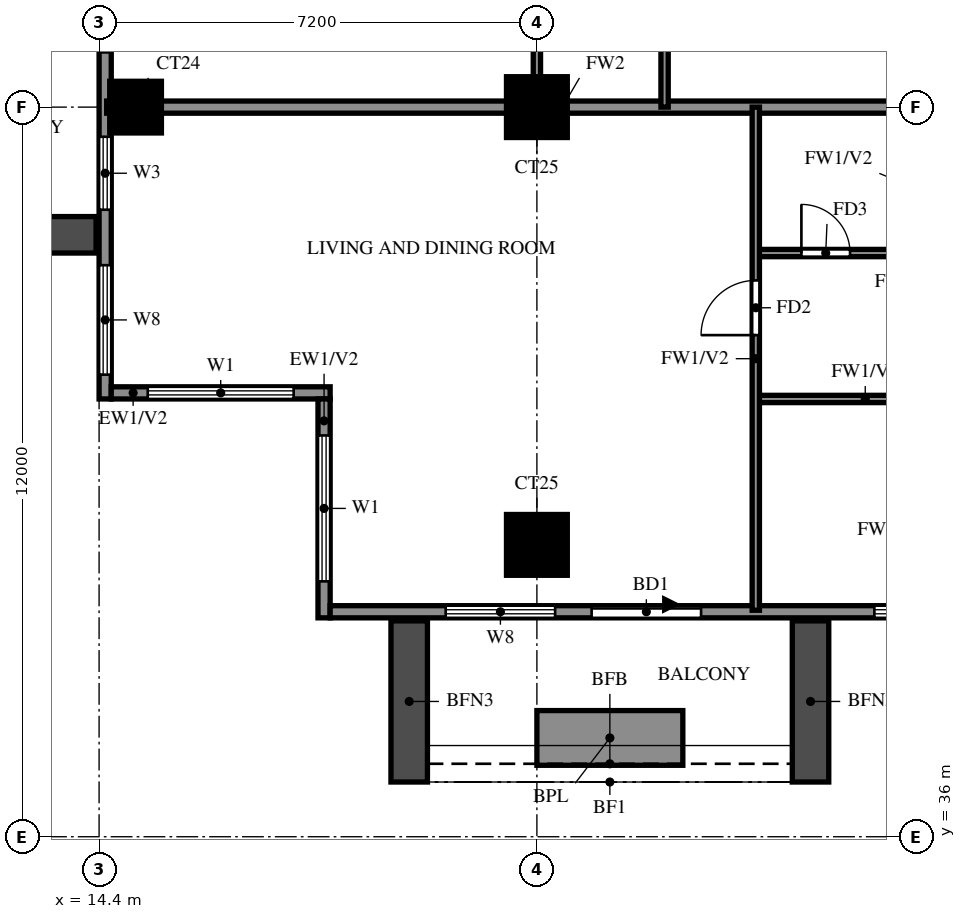
"""IFC4 building model, lengths in metres.
Left out: names, types, materials, properties, quantities, classifications, styles, units other than length and angle.
Written with IfcOpenShell. Run it as: python <this file> out.ifc"""

import sys

from ifc_helpers import new_model, si_unit, direction, frame, frame_2d, origin, origin_2d, place, context, subcontext, project, spatial, rectangle, extrude, source, transform, mapped, element, fill, save


model = new_model("IFC4")
c1 = context("Model", 3, precision=1e-05, world=origin(), true_north=direction((0.0, 1.0)))
c2 = subcontext(c1, "Body", "Model", "MODEL_VIEW")
j1 = project(units=[si_unit("LENGTHUNIT", "METRE"), si_unit("PLANEANGLEUNIT", "RADIAN")], contexts=[c1])
p1 = place(None, origin())
s1 = spatial("IfcSite", under=j1, at=p1, CompositionType="ELEMENT")
p2 = place(p1, origin())
s2 = spatial("IfcBuilding", under=s1, at=p2, CompositionType="ELEMENT")
p3 = place(p2, frame((0.0, 0.0, 157.0)))
s3 = spatial("IfcBuildingStorey", under=s2, at=p3, CompositionType="ELEMENT", Elevation=157.0)
m1 = source(origin(), c2, "Body", "SweptSolid", [
    extrude(rectangle(XDim=1.0, YDim=1.0, at=origin_2d()), origin(), (0.0, 0.0, 1.0), 3.2),
])
p4 = place(p3, frame((21.6, 40.8, 0.0), z_axis=(0.0, 0.0, 1.0), x_axis=(1.0, 0.0, 0.0)))
e1 = element("IfcColumn", 1, at=p4, inside=s3, PredefinedType="COLUMN", context=c2, shape_type="MappedRepresentation", body=[
    mapped(m1, transform((0.0, 0.0, 0.0))),
])
m2 = source(origin(), c2, "Body", "SweptSolid", [
    extrude(rectangle(XDim=0.85, YDim=0.85, at=origin_2d()), origin(), (0.0, 0.0, 1.0), 3.2),
])
p5 = place(p3, frame((15.0, 48.0, 0.0), z_axis=(0.0, 0.0, 1.0), x_axis=(1.0, 0.0, 0.0)))
e2 = element("IfcColumn", 2, at=p5, inside=s3, PredefinedType="COLUMN", context=c2, shape_type="MappedRepresentation", body=[
    mapped(m2, transform((0.0, 0.0, 0.0))),
])
p6 = place(p3, frame((21.6, 48.0, 0.0), z_axis=(0.0, 0.0, 1.0), x_axis=(1.0, 0.0, 0.0)))
e3 = element("IfcColumn", 3, at=p6, inside=s3, PredefinedType="COLUMN", context=c2, shape_type="MappedRepresentation", body=[
    mapped(m1, transform((0.0, 0.0, 0.0))),
])
p7 = place(p3, frame((14.5, 76.6, 0.0), z_axis=(0.0, 0.0, 1.0), x_axis=(0.0, -1.0, 0.0)))
e4 = element("IfcWall", 4, at=p7, inside=s3, PredefinedType="SOLIDWALL", context=c2, shape_type="SweptSolid", body=[
    extrude(rectangle(XDim=33.4, YDim=0.2, at=frame_2d((16.7, 0.0))), origin(), (0.0, 0.0, 1.0), 3.2),
])
p8 = place(p7, frame((11.5, 0.0, 0.0)))
e5 = element("IfcOpeningElement", 5, at=p8, cuts=e4, PredefinedType="OPENING", context=c2, shape_type="SweptSolid", body=[
    extrude(rectangle(XDim=1.8, YDim=2.4, at=frame_2d((0.9, 1.2))), frame((0.0, 0.11, 0.0), z_axis=(0.0, -1.0, 0.0), x_axis=(1.0, 0.0, 0.0)), (0.0, 0.0, 1.0), 0.22),
])
p9 = place(p7, frame((25.9, 0.0, 0.0)))
e6 = element("IfcOpeningElement", 6, at=p9, cuts=e4, PredefinedType="OPENING", context=c2, shape_type="SweptSolid", body=[
    extrude(rectangle(XDim=1.8, YDim=2.4, at=frame_2d((0.9, 1.2))), frame((0.0, 0.11, 0.0), z_axis=(0.0, -1.0, 0.0), x_axis=(1.0, 0.0, 0.0)), (0.0, 0.0, 1.0), 0.22),
])
p10 = place(p7, frame((29.087, 0.0, 0.6)))
e7 = element("IfcOpeningElement", 7, at=p10, cuts=e4, PredefinedType="OPENING", context=c2, shape_type="SweptSolid", body=[
    extrude(rectangle(XDim=1.2, YDim=2.4, at=frame_2d((0.6, 1.2))), frame((0.0, 0.11, 0.0), z_axis=(0.0, -1.0, 0.0), x_axis=(1.0, 0.0, 0.0)), (0.0, 0.0, 1.0), 0.22),
])
p11 = place(p7, frame((31.2, 0.0, 0.6)))
e8 = element("IfcOpeningElement", 8, at=p11, cuts=e4, PredefinedType="OPENING", context=c2, shape_type="SweptSolid", body=[
    extrude(rectangle(XDim=1.8, YDim=2.4, at=frame_2d((0.9, 1.2))), frame((0.0, 0.11, 0.0), z_axis=(0.0, -1.0, 0.0), x_axis=(1.0, 0.0, 0.0)), (0.0, 0.0, 1.0), 0.22),
])
p12 = place(p7, frame((21.887, 0.0, 0.6)))
e9 = element("IfcOpeningElement", 9, at=p12, cuts=e4, PredefinedType="OPENING", context=c2, shape_type="SweptSolid", body=[
    extrude(rectangle(XDim=1.8, YDim=2.4, at=frame_2d((0.9, 1.2))), frame((0.0, 0.11, 0.0), z_axis=(0.0, -1.0, 0.0), x_axis=(1.0, 0.0, 0.0)), (0.0, 0.0, 1.0), 0.22),
])
p13 = place(p7, frame((24.55, 0.0, 0.6)))
e10 = element("IfcOpeningElement", 10, at=p13, cuts=e4, PredefinedType="OPENING", context=c2, shape_type="SweptSolid", body=[
    extrude(rectangle(XDim=0.9, YDim=2.4, at=frame_2d((0.45, 1.2))), frame((0.0, 0.11, 0.0), z_axis=(0.0, -1.0, 0.0), x_axis=(1.0, 0.0, 0.0)), (0.0, 0.0, 1.0), 0.22),
])
p14 = place(p7, frame((18.212, 0.0, 0.6)))
e11 = element("IfcOpeningElement", 11, at=p14, cuts=e4, PredefinedType="OPENING", context=c2, shape_type="SweptSolid", body=[
    extrude(rectangle(XDim=2.4, YDim=2.4, at=frame_2d((1.2, 1.2))), frame((0.0, 0.11, 0.0), z_axis=(0.0, -1.0, 0.0), x_axis=(1.0, 0.0, 0.0)), (0.0, 0.0, 1.0), 0.22),
])
p15 = place(p7, frame((14.688, 0.0, 0.6)))
e12 = element("IfcOpeningElement", 12, at=p15, cuts=e4, PredefinedType="OPENING", context=c2, shape_type="SweptSolid", body=[
    extrude(rectangle(XDim=1.2, YDim=2.4, at=frame_2d((0.6, 1.2))), frame((0.0, 0.11, 0.0), z_axis=(0.0, -1.0, 0.0), x_axis=(1.0, 0.0, 0.0)), (0.0, 0.0, 1.0), 0.22),
])
p16 = place(p7, frame((16.75, 0.0, 0.6)))
e13 = element("IfcOpeningElement", 13, at=p16, cuts=e4, PredefinedType="OPENING", context=c2, shape_type="SweptSolid", body=[
    extrude(rectangle(XDim=0.9, YDim=2.4, at=frame_2d((0.45, 1.2))), frame((0.0, 0.11, 0.0), z_axis=(0.0, -1.0, 0.0), x_axis=(1.0, 0.0, 0.0)), (0.0, 0.0, 1.0), 0.22),
])
p17 = place(p7, frame((7.488, 0.0, 0.6)))
e14 = element("IfcOpeningElement", 14, at=p17, cuts=e4, PredefinedType="OPENING", context=c2, shape_type="SweptSolid", body=[
    extrude(rectangle(XDim=1.8, YDim=2.4, at=frame_2d((0.9, 1.2))), frame((0.0, 0.11, 0.0), z_axis=(0.0, -1.0, 0.0), x_axis=(1.0, 0.0, 0.0)), (0.0, 0.0, 1.0), 0.22),
])
p18 = place(p7, frame((10.15, 0.0, 0.6)))
e15 = element("IfcOpeningElement", 15, at=p18, cuts=e4, PredefinedType="OPENING", context=c2, shape_type="SweptSolid", body=[
    extrude(rectangle(XDim=0.9, YDim=2.4, at=frame_2d((0.45, 1.2))), frame((0.0, 0.11, 0.0), z_axis=(0.0, -1.0, 0.0), x_axis=(1.0, 0.0, 0.0)), (0.0, 0.0, 1.0), 0.22),
])
p19 = place(p7, frame((4.562, 0.0, 1.5)))
e16 = element("IfcOpeningElement", 16, at=p19, cuts=e4, PredefinedType="OPENING", context=c2, shape_type="SweptSolid", body=[
    extrude(rectangle(XDim=0.9, YDim=0.9, at=frame_2d((0.45, 0.45))), frame((0.0, 0.11, 0.0), z_axis=(0.0, -1.0, 0.0), x_axis=(1.0, 0.0, 0.0)), (0.0, 0.0, 1.0), 0.22),
])
p20 = place(p7, frame((0.6, 0.0, 0.6)))
e17 = element("IfcOpeningElement", 17, at=p20, cuts=e4, PredefinedType="OPENING", context=c2, shape_type="SweptSolid", body=[
    extrude(rectangle(XDim=2.4, YDim=2.4, at=frame_2d((1.2, 1.2))), frame((0.0, 0.11, 0.0), z_axis=(0.0, -1.0, 0.0), x_axis=(1.0, 0.0, 0.0)), (0.0, 0.0, 1.0), 0.22),
])
p21 = place(p3, frame((14.6, 43.3, 0.0), z_axis=(0.0, 0.0, 1.0), x_axis=(1.0, 0.0, 0.0)))
e18 = element("IfcWall", 18, at=p21, inside=s3, PredefinedType="SOLIDWALL", context=c2, shape_type="SweptSolid", body=[
    extrude(rectangle(XDim=3.6, YDim=0.2, at=frame_2d((1.8, 0.0))), origin(), (0.0, 0.0, 1.0), 3.2),
])
p22 = place(p21, frame((0.6, 0.0, 0.6)))
e19 = element("IfcOpeningElement", 19, at=p22, cuts=e18, PredefinedType="OPENING", context=c2, shape_type="SweptSolid", body=[
    extrude(rectangle(XDim=2.4, YDim=2.4, at=frame_2d((1.2, 1.2))), frame((0.0, 0.11, 0.0), z_axis=(0.0, -1.0, 0.0), x_axis=(1.0, 0.0, 0.0)), (0.0, 0.0, 1.0), 0.22),
])
p23 = place(p3, frame((18.1, 43.2, 0.0), z_axis=(0.0, 0.0, 1.0), x_axis=(0.0, -1.0, 0.0)))
e20 = element("IfcWall", 20, at=p23, inside=s3, PredefinedType="SOLIDWALL", context=c2, shape_type="SweptSolid", body=[
    extrude(rectangle(XDim=3.6, YDim=0.2, at=frame_2d((1.8, 0.0))), origin(), (0.0, 0.0, 1.0), 3.2),
])
p24 = place(p23, frame((0.6, 0.0, 0.6)))
e21 = element("IfcOpeningElement", 21, at=p24, cuts=e20, PredefinedType="OPENING", context=c2, shape_type="SweptSolid", body=[
    extrude(rectangle(XDim=2.4, YDim=2.4, at=frame_2d((1.2, 1.2))), frame((0.0, 0.11, 0.0), z_axis=(0.0, -1.0, 0.0), x_axis=(1.0, 0.0, 0.0)), (0.0, 0.0, 1.0), 0.22),
])
p25 = place(p3, frame((18.2, 39.7, 0.0), z_axis=(0.0, 0.0, 1.0), x_axis=(1.0, 0.0, 0.0)))
e22 = element("IfcWall", 22, at=p25, inside=s3, PredefinedType="SOLIDWALL", context=c2, shape_type="SweptSolid", body=[
    extrude(rectangle(XDim=23.8, YDim=0.2, at=frame_2d((11.9, 0.0))), origin(), (0.0, 0.0, 1.0), 3.2),
])
p26 = place(p25, frame((4.3, 0.0, 0.0)))
e23 = element("IfcOpeningElement", 23, at=p26, cuts=e22, PredefinedType="OPENING", context=c2, shape_type="SweptSolid", body=[
    extrude(rectangle(XDim=1.8, YDim=2.4, at=frame_2d((0.9, 1.2))), frame((0.0, 0.11, 0.0), z_axis=(0.0, -1.0, 0.0), x_axis=(1.0, 0.0, 0.0)), (0.0, 0.0, 1.0), 0.22),
])
p27 = place(p25, frame((1.9, 0.0, 0.6)))
e24 = element("IfcOpeningElement", 24, at=p27, cuts=e22, PredefinedType="OPENING", context=c2, shape_type="SweptSolid", body=[
    extrude(rectangle(XDim=1.8, YDim=2.4, at=frame_2d((0.9, 1.2))), frame((0.0, 0.11, 0.0), z_axis=(0.0, -1.0, 0.0), x_axis=(1.0, 0.0, 0.0)), (0.0, 0.0, 1.0), 0.22),
])
p28 = place(p25, frame((11.8, 0.0, 0.6)))
e25 = element("IfcOpeningElement", 25, at=p28, cuts=e22, PredefinedType="OPENING", context=c2, shape_type="SweptSolid", body=[
    extrude(rectangle(XDim=2.4, YDim=2.4, at=frame_2d((1.2, 1.2))), frame((0.0, 0.11, 0.0), z_axis=(0.0, -1.0, 0.0), x_axis=(1.0, 0.0, 0.0)), (0.0, 0.0, 1.0), 0.22),
])
p29 = place(p25, frame((8.95, 0.0, 1.5)))
e26 = element("IfcOpeningElement", 26, at=p29, cuts=e22, PredefinedType="OPENING", context=c2, shape_type="SweptSolid", body=[
    extrude(rectangle(XDim=0.9, YDim=0.9, at=frame_2d((0.45, 0.45))), frame((0.0, 0.11, 0.0), z_axis=(0.0, -1.0, 0.0), x_axis=(1.0, 0.0, 0.0)), (0.0, 0.0, 1.0), 0.22),
])
for number, where, z_axis, x_axis in (
    (27, (14.35, 45.9, 0.0), (0.0, 0.0, 1.0), (-1.0, 0.0, 0.0)),
    (28, (19.5, 39.55, 0.0), (0.0, 0.0, 1.0), (0.0, -1.0, 0.0)),
    (29, (26.1, 39.55, 0.0), (0.0, 0.0, 1.0), (0.0, -1.0, 0.0)),
):
    element("IfcWall", number, at=place(p3, frame(where, z_axis=z_axis, x_axis=x_axis)), inside=s3, PredefinedType="SOLIDWALL", context=c2, shape_type="SweptSolid", body=[
        extrude(rectangle(XDim=2.65, YDim=0.6, at=frame_2d((1.325, 0.0))), origin(), (0.0, 0.0, 1.0), 2.85),
    ])
p30 = place(p3, frame((21.6, 37.625, 0.0), z_axis=(0.0, 0.0, 1.0), x_axis=(1.0, 0.0, 0.0)))
e30 = element("IfcWall", 30, at=p30, inside=s3, PredefinedType="SOLIDWALL", context=c2, shape_type="SweptSolid", body=[
    extrude(rectangle(XDim=2.4, YDim=0.9, at=frame_2d((1.2, 0.0))), origin(), (0.0, 0.0, 1.0), 0.9),
])
p31 = place(p3, frame((14.525, 48.0, 0.0), z_axis=(0.0, 0.0, 1.0), x_axis=(1.0, 0.0, 0.0)))
e31 = element("IfcWall", 31, at=p31, inside=s3, PredefinedType="SOLIDWALL", context=c2, shape_type="SweptSolid", body=[
    extrude(rectangle(XDim=14.275, YDim=0.2, at=frame_2d((7.138, 0.0))), origin(), (0.0, 0.0, 1.0), 3.2),
])
p32 = place(p3, frame((25.2, 43.2, 0.0), z_axis=(0.0, 0.0, 1.0), x_axis=(1.0, 0.0, 0.0)))
e32 = element("IfcWall", 32, at=p32, inside=s3, PredefinedType="PARTITIONING", context=c2, shape_type="SweptSolid", body=[
    extrude(rectangle(XDim=3.6, YDim=0.12, at=frame_2d((1.8, 0.0))), origin(), (0.0, 0.0, 1.0), 3.2),
])
p33 = place(p3, frame((25.2, 45.6, 0.0), z_axis=(0.0, 0.0, 1.0), x_axis=(1.0, 0.0, 0.0)))
e33 = element("IfcWall", 33, at=p33, inside=s3, PredefinedType="PARTITIONING", context=c2, shape_type="SweptSolid", body=[
    extrude(rectangle(XDim=6.0, YDim=0.12, at=frame_2d((3.0, 0.0))), origin(), (0.0, 0.0, 1.0), 3.2),
])
p34 = place(p33, frame((0.75, 0.0, 0.0)))
e34 = element("IfcOpeningElement", 34, at=p34, cuts=e33, PredefinedType="OPENING", context=c2, shape_type="SweptSolid", body=[
    extrude(rectangle(XDim=0.8, YDim=2.1, at=frame_2d((0.4, 1.05))), frame((0.0, 0.07, 0.0), z_axis=(0.0, -1.0, 0.0), x_axis=(1.0, 0.0, 0.0)), (0.0, 0.0, 1.0), 0.14),
])
p35 = place(p33, frame((3.7, 0.0, 0.0)))
e35 = element("IfcOpeningElement", 35, at=p35, cuts=e33, PredefinedType="OPENING", context=c2, shape_type="SweptSolid", body=[
    extrude(rectangle(XDim=0.9, YDim=2.1, at=frame_2d((0.45, 1.05))), frame((0.0, 0.07, 0.0), z_axis=(0.0, -1.0, 0.0), x_axis=(1.0, 0.0, 0.0)), (0.0, 0.0, 1.0), 0.14),
])
p36 = place(p3, frame((21.6, 48.0, 0.0), z_axis=(0.0, 0.0, 1.0), x_axis=(0.0, 1.0, 0.0)))
e36 = element("IfcWall", 36, at=p36, inside=s3, PredefinedType="PARTITIONING", context=c2, shape_type="SweptSolid", body=[
    extrude(rectangle(XDim=21.6, YDim=0.12, at=frame_2d((10.8, 0.0))), origin(), (0.0, 0.0, 1.0), 3.2),
])
p37 = place(p36, frame((2.85, 0.0, 0.0)))
e37 = element("IfcOpeningElement", 37, at=p37, cuts=e36, PredefinedType="OPENING", context=c2, shape_type="SweptSolid", body=[
    extrude(rectangle(XDim=1.5, YDim=2.1, at=frame_2d((0.75, 1.05))), frame((0.0, 0.07, 0.0), z_axis=(0.0, -1.0, 0.0), x_axis=(1.0, 0.0, 0.0)), (0.0, 0.0, 1.0), 0.14),
])
p38 = place(p36, frame((8.55, 0.0, 0.0)))
e38 = element("IfcOpeningElement", 38, at=p38, cuts=e36, PredefinedType="OPENING", context=c2, shape_type="SweptSolid", body=[
    extrude(rectangle(XDim=0.9, YDim=2.1, at=frame_2d((0.45, 1.05))), frame((0.0, 0.07, 0.0), z_axis=(0.0, -1.0, 0.0), x_axis=(1.0, 0.0, 0.0)), (0.0, 0.0, 1.0), 0.14),
])
p39 = place(p36, frame((12.15, 0.0, 0.0)))
e39 = element("IfcOpeningElement", 39, at=p39, cuts=e36, PredefinedType="OPENING", context=c2, shape_type="SweptSolid", body=[
    extrude(rectangle(XDim=0.9, YDim=2.1, at=frame_2d((0.45, 1.05))), frame((0.0, 0.07, 0.0), z_axis=(0.0, -1.0, 0.0), x_axis=(1.0, 0.0, 0.0)), (0.0, 0.0, 1.0), 0.14),
])
p40 = place(p36, frame((17.55, 0.0, 0.0)))
e40 = element("IfcOpeningElement", 40, at=p40, cuts=e36, PredefinedType="OPENING", context=c2, shape_type="SweptSolid", body=[
    extrude(rectangle(XDim=0.9, YDim=2.1, at=frame_2d((0.45, 1.05))), frame((0.0, 0.07, 0.0), z_axis=(0.0, -1.0, 0.0), x_axis=(1.0, 0.0, 0.0)), (0.0, 0.0, 1.0), 0.14),
])
p41 = place(p3, frame((23.7, 48.0, 0.0), z_axis=(0.0, 0.0, 1.0), x_axis=(0.0, 1.0, 0.0)))
e41 = element("IfcWall", 41, at=p41, inside=s3, PredefinedType="PARTITIONING", context=c2, shape_type="SweptSolid", body=[
    extrude(rectangle(XDim=2.4, YDim=0.12, at=frame_2d((1.2, 0.0))), origin(), (0.0, 0.0, 1.0), 3.2),
])
p42 = place(p3, frame((25.2, 39.725, 0.0), z_axis=(0.0, 0.0, 1.0), x_axis=(0.0, 1.0, 0.0)))
e42 = element("IfcWall", 42, at=p42, inside=s3, PredefinedType="PARTITIONING", context=c2, shape_type="SweptSolid", body=[
    extrude(rectangle(XDim=8.275, YDim=0.12, at=frame_2d((4.137, 0.0))), origin(), (0.0, 0.0, 1.0), 3.2),
])
p43 = place(p42, frame((4.525, 0.0, 0.0)))
e43 = element("IfcOpeningElement", 43, at=p43, cuts=e42, PredefinedType="OPENING", context=c2, shape_type="SweptSolid", body=[
    extrude(rectangle(XDim=0.9, YDim=2.1, at=frame_2d((0.45, 1.05))), frame((0.0, 0.07, 0.0), z_axis=(0.0, -1.0, 0.0), x_axis=(1.0, 0.0, 0.0)), (0.0, 0.0, 1.0), 0.14),
])
p44 = place(p10, origin())
e44 = element("IfcWindow", 44, at=p44, inside=s3, PartitioningType="SINGLE_PANEL", PredefinedType="WINDOW", context=c2, shape_type="SweptSolid", body=[
    extrude(rectangle(XDim=1.2, YDim=2.4, at=frame_2d((0.6, 1.2))), frame((0.0, 0.03, 0.0), z_axis=(0.0, -1.0, 0.0), x_axis=(1.0, 0.0, 0.0)), (0.0, 0.0, 1.0), 0.06),
])
fill(e7, e44)
p45 = place(p11, origin())
e45 = element("IfcWindow", 45, at=p45, inside=s3, PartitioningType="DOUBLE_PANEL_VERTICAL", PredefinedType="WINDOW", context=c2, shape_type="SweptSolid", body=[
    extrude(rectangle(XDim=1.8, YDim=2.4, at=frame_2d((0.9, 1.2))), frame((0.0, 0.03, 0.0), z_axis=(0.0, -1.0, 0.0), x_axis=(1.0, 0.0, 0.0)), (0.0, 0.0, 1.0), 0.06),
])
fill(e8, e45)
p46 = place(p22, origin())
e46 = element("IfcWindow", 46, at=p46, inside=s3, PartitioningType="DOUBLE_PANEL_VERTICAL", PredefinedType="WINDOW", context=c2, shape_type="SweptSolid", body=[
    extrude(rectangle(XDim=2.4, YDim=2.4, at=frame_2d((1.2, 1.2))), frame((0.0, 0.03, 0.0), z_axis=(0.0, -1.0, 0.0), x_axis=(1.0, 0.0, 0.0)), (0.0, 0.0, 1.0), 0.06),
])
fill(e19, e46)
p47 = place(p24, origin())
e47 = element("IfcWindow", 47, at=p47, inside=s3, PartitioningType="DOUBLE_PANEL_VERTICAL", PredefinedType="WINDOW", context=c2, shape_type="SweptSolid", body=[
    extrude(rectangle(XDim=2.4, YDim=2.4, at=frame_2d((1.2, 1.2))), frame((0.0, 0.03, 0.0), z_axis=(0.0, -1.0, 0.0), x_axis=(1.0, 0.0, 0.0)), (0.0, 0.0, 1.0), 0.06),
])
fill(e21, e47)
p48 = place(p26, origin())
e48 = element("IfcDoor", 48, at=p48, inside=s3, OperationType="DOUBLE_DOOR_SLIDING", PredefinedType="DOOR", context=c2, shape_type="SweptSolid", body=[
    extrude(rectangle(XDim=1.8, YDim=2.4, at=frame_2d((0.9, 1.2))), frame((0.0, 0.025, 0.0), z_axis=(0.0, -1.0, 0.0), x_axis=(1.0, 0.0, 0.0)), (0.0, 0.0, 1.0), 0.05),
])
fill(e23, e48)
p49 = place(p27, origin())
e49 = element("IfcWindow", 49, at=p49, inside=s3, PartitioningType="DOUBLE_PANEL_VERTICAL", PredefinedType="WINDOW", context=c2, shape_type="SweptSolid", body=[
    extrude(rectangle(XDim=1.8, YDim=2.4, at=frame_2d((0.9, 1.2))), frame((0.0, 0.03, 0.0), z_axis=(0.0, -1.0, 0.0), x_axis=(1.0, 0.0, 0.0)), (0.0, 0.0, 1.0), 0.06),
])
fill(e24, e49)
p50 = place(p29, origin())
e50 = element("IfcWindow", 50, at=p50, inside=s3, PartitioningType="SINGLE_PANEL", PredefinedType="WINDOW", context=c2, shape_type="SweptSolid", body=[
    extrude(rectangle(XDim=0.9, YDim=0.9, at=frame_2d((0.45, 0.45))), frame((0.0, 0.03, 0.0), z_axis=(0.0, -1.0, 0.0), x_axis=(1.0, 0.0, 0.0)), (0.0, 0.0, 1.0), 0.06),
])
fill(e26, e50)
p51 = place(p43, origin())
e51 = element("IfcDoor", 51, at=p51, inside=s3, OperationType="SINGLE_SWING_RIGHT", PredefinedType="DOOR", context=c2, shape_type="SweptSolid", body=[
    extrude(rectangle(XDim=0.9, YDim=2.1, at=frame_2d((0.45, 1.05))), frame((0.0, 0.025, 0.0), z_axis=(0.0, -1.0, 0.0), x_axis=(1.0, 0.0, 0.0)), (0.0, 0.0, 1.0), 0.05),
])
fill(e43, e51)
p52 = place(p34, origin())
e52 = element("IfcDoor", 52, at=p52, inside=s3, OperationType="SINGLE_SWING_RIGHT", PredefinedType="DOOR", context=c2, shape_type="SweptSolid", body=[
    extrude(rectangle(XDim=0.8, YDim=2.1, at=frame_2d((0.4, 1.05))), frame((0.0, 0.025, 0.0), z_axis=(0.0, -1.0, 0.0), x_axis=(1.0, 0.0, 0.0)), (0.0, 0.0, 1.0), 0.05),
])
fill(e34, e52)
save(model, sys.argv[1])
